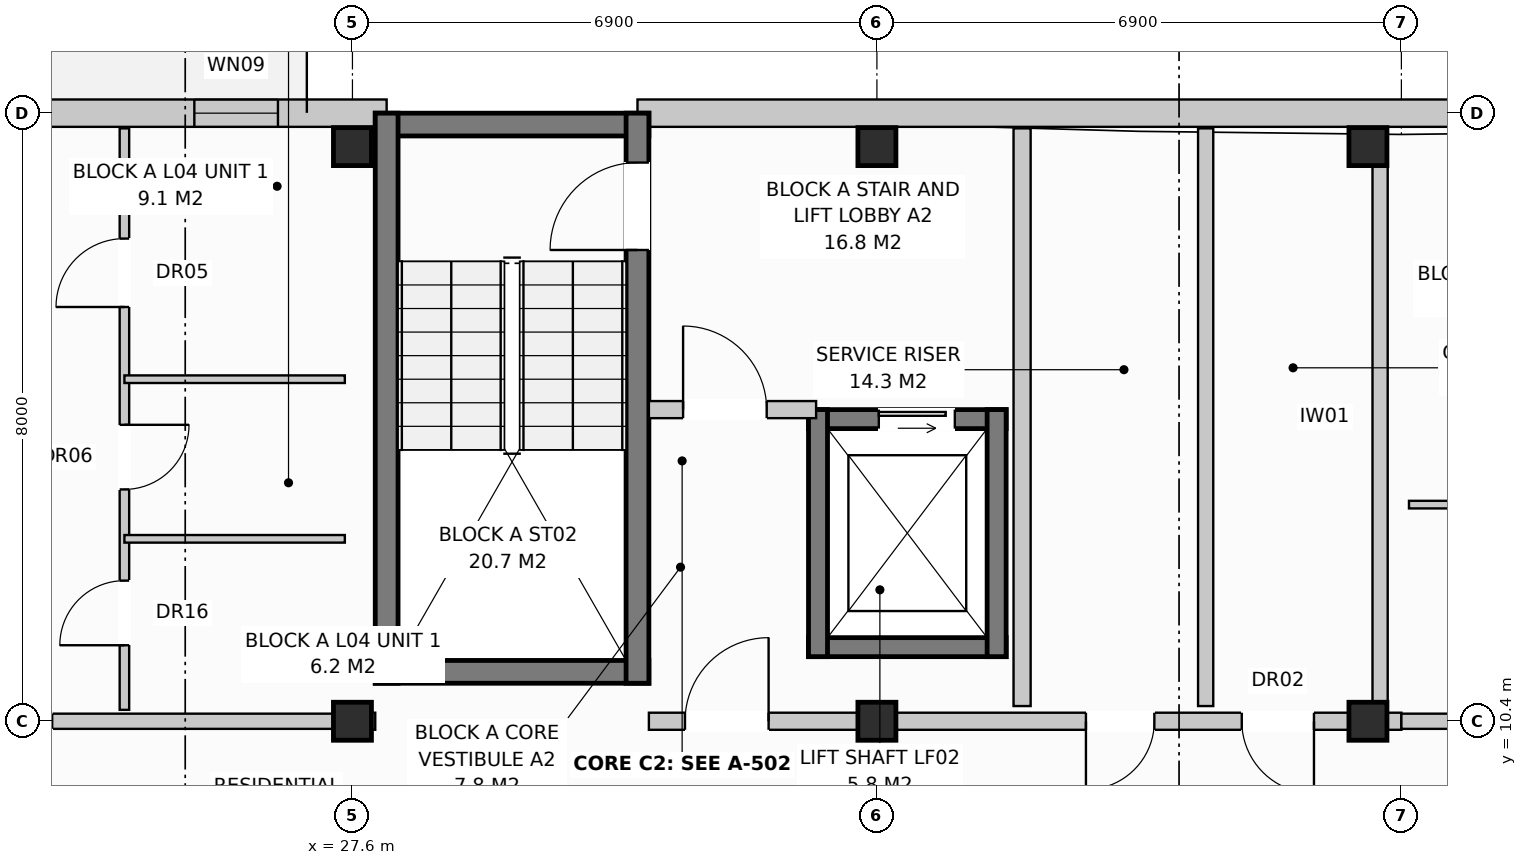
"""IFC4 building model, lengths in metres.
Left out: names, types, materials, properties, quantities, classifications, styles, units other than length and angle.
Written with IfcOpenShell. Run it as: python <this file> out.ifc"""

import sys

from ifc_helpers import new_model, si_unit, direction, frame, frame_2d, origin, origin_with_axes, origin_2d, place, context, subcontext, project, spatial, rectangle, extrude, element, fill, save


model = new_model("IFC4")
c1 = context("Model", 3, precision=1e-05, world=origin(), true_north=direction((0.0, 1.0)))
c2 = subcontext(c1, "Body", "Model", "MODEL_VIEW")
j1 = project(units=[si_unit("LENGTHUNIT", "METRE"), si_unit("PLANEANGLEUNIT", "RADIAN")], contexts=[c1])
p1 = place(None, origin())
s1 = spatial("IfcSite", under=j1, at=p1, CompositionType="ELEMENT")
p2 = place(p1, origin())
s2 = spatial("IfcBuilding", under=s1, at=p2, CompositionType="ELEMENT")
p3 = place(p2, frame((0.0, 0.0, 14.4)))
s3 = spatial("IfcBuildingStorey", under=s2, at=p3, CompositionType="ELEMENT", Elevation=14.4)
for number, where, z_axis, x_axis in (
    (1, (27.6, 10.4, 0.0), (0.0, 0.0, 1.0), (1.0, 0.0, 0.0)),
    (2, (27.6, 17.96, 0.0), (0.0, 0.0, 1.0), (1.0, 0.0, 0.0)),
    (3, (34.5, 10.4, 0.0), (0.0, 0.0, 1.0), (1.0, 0.0, 0.0)),
    (4, (34.5, 17.96, 0.0), (0.0, 0.0, 1.0), (1.0, 0.0, 0.0)),
    (5, (40.96, 10.4, 0.0), (0.0, 0.0, 1.0), (1.0, 0.0, 0.0)),
    (6, (40.96, 17.96, 0.0), (0.0, 0.0, 1.0), (1.0, 0.0, 0.0)),
):
    element("IfcColumn", number, at=place(p3, frame(where, z_axis=z_axis, x_axis=x_axis)), inside=s3, PredefinedType="COLUMN", context=c2, shape_type="SweptSolid", body=[
        extrude(rectangle(XDim=0.5, YDim=0.5, at=origin_2d()), origin(), (0.0, 0.0, 1.0), 3.2),
    ])
p4 = place(p3, frame((10.65, 18.4, 0.0), z_axis=(0.0, 0.0, 1.0), x_axis=(1.0, 0.0, 0.0)))
e7 = element("IfcWall", 7, at=p4, inside=s3, PredefinedType="STANDARD", context=c2, shape_type="SweptSolid", body=[
    extrude(rectangle(XDim=17.4, YDim=0.36, at=frame_2d((8.7, 0.0))), origin(), (0.0, 0.0, 1.0), 2.94),
])
p5 = place(p4, frame((11.82, 0.0, 0.0)))
e8 = element("IfcOpeningElement", 8, at=p5, cuts=e7, PredefinedType="OPENING", context=c2, shape_type="SweptSolid", body=[
    extrude(rectangle(XDim=1.05, YDim=2.12, at=frame_2d((0.525, 1.06))), frame((0.0, 0.192, 0.0), z_axis=(0.0, -1.0, 0.0), x_axis=(1.0, 0.0, 0.0)), (0.0, 0.0, 1.0), 0.384),
])
p6 = place(p4, frame((14.87, 0.0, 0.72)))
e9 = element("IfcOpeningElement", 9, at=p6, cuts=e7, PredefinedType="OPENING", context=c2, shape_type="SweptSolid", body=[
    extrude(rectangle(XDim=1.1, YDim=1.5, at=frame_2d((0.55, 0.75))), frame((0.0, 0.192, 0.0), z_axis=(0.0, -1.0, 0.0), x_axis=(1.0, 0.0, 0.0)), (0.0, 0.0, 1.0), 0.384),
])
p7 = place(p3, frame((31.35, 18.4, 0.0), z_axis=(0.0, 0.0, 1.0), x_axis=(1.0, 0.0, 0.0)))
e10 = element("IfcWall", 10, at=p7, inside=s3, PredefinedType="STANDARD", context=c2, shape_type="SweptSolid", body=[
    extrude(rectangle(XDim=23.68, YDim=0.36, at=frame_2d((11.84, 0.0))), origin(), (0.0, 0.0, 1.0), 2.94),
])
p8 = place(p7, frame((13.003, 0.0, 0.0)))
e11 = element("IfcOpeningElement", 11, at=p8, cuts=e10, PredefinedType="OPENING", context=c2, shape_type="SweptSolid", body=[
    extrude(rectangle(XDim=1.05, YDim=2.12, at=frame_2d((0.525, 1.06))), frame((0.0, 0.192, 0.0), z_axis=(0.0, -1.0, 0.0), x_axis=(1.0, 0.0, 0.0)), (0.0, 0.0, 1.0), 0.384),
])
p9 = place(p7, frame((11.27, 0.0, 0.72)))
e12 = element("IfcOpeningElement", 12, at=p9, cuts=e10, PredefinedType="OPENING", context=c2, shape_type="SweptSolid", body=[
    extrude(rectangle(XDim=1.1, YDim=1.5, at=frame_2d((0.55, 0.75))), frame((0.0, 0.192, 0.0), z_axis=(0.0, -1.0, 0.0), x_axis=(1.0, 0.0, 0.0)), (0.0, 0.0, 1.0), 0.384),
])
p10 = place(p7, frame((14.545, 0.0, 0.8)))
e13 = element("IfcOpeningElement", 13, at=p10, cuts=e10, PredefinedType="OPENING", context=c2, shape_type="SweptSolid", body=[
    extrude(rectangle(XDim=1.95, YDim=1.65, at=frame_2d((0.975, 0.825))), frame((0.0, 0.192, 0.0), z_axis=(0.0, -1.0, 0.0), x_axis=(1.0, 0.0, 0.0)), (0.0, 0.0, 1.0), 0.384),
])
p11 = place(p7, frame((20.67, 0.0, 0.72)))
e14 = element("IfcOpeningElement", 14, at=p11, cuts=e10, PredefinedType="OPENING", context=c2, shape_type="SweptSolid", body=[
    extrude(rectangle(XDim=1.1, YDim=1.5, at=frame_2d((0.55, 0.75))), frame((0.0, 0.192, 0.0), z_axis=(0.0, -1.0, 0.0), x_axis=(1.0, 0.0, 0.0)), (0.0, 0.0, 1.0), 0.384),
])
for number, where, z_axis, x_axis in (
    (15, (27.9, 18.25, 0.0), (0.0, 0.0, 1.0), (1.0, 0.0, 0.0)),
    (16, (27.9, 11.05, 0.0), (0.0, 0.0, 1.0), (1.0, 0.0, 0.0)),
):
    element("IfcWall", number, at=place(p3, frame(where, z_axis=z_axis, x_axis=x_axis)), inside=s3, PredefinedType="SHEAR", context=c2, shape_type="SweptSolid", body=[
        extrude(rectangle(XDim=3.6, YDim=0.3, at=frame_2d((1.8, 0.0))), origin(), (0.0, 0.0, 1.0), 2.94),
    ])
p12 = place(p3, frame((28.05, 10.9, 0.0), z_axis=(0.0, 0.0, 1.0), x_axis=(0.0, 1.0, 0.0)))
e17 = element("IfcWall", 17, at=p12, inside=s3, PredefinedType="SHEAR", context=c2, shape_type="SweptSolid", body=[
    extrude(rectangle(XDim=7.5, YDim=0.3, at=frame_2d((3.75, 0.0))), origin(), (0.0, 0.0, 1.0), 2.94),
])
p13 = place(p3, frame((31.35, 10.9, 0.0), z_axis=(0.0, 0.0, 1.0), x_axis=(0.0, 1.0, 0.0)))
e18 = element("IfcWall", 18, at=p13, inside=s3, PredefinedType="SHEAR", context=c2, shape_type="SweptSolid", body=[
    extrude(rectangle(XDim=7.5, YDim=0.3, at=frame_2d((3.75, 0.0))), origin(), (0.0, 0.0, 1.0), 2.94),
])
p14 = place(p13, frame((5.7, 0.0, 0.0)))
e19 = element("IfcOpeningElement", 19, at=p14, cuts=e18, PredefinedType="OPENING", context=c2, shape_type="SweptSolid", body=[
    extrude(rectangle(XDim=1.15, YDim=2.15, at=frame_2d((0.575, 1.075))), frame((0.0, 0.162, 0.0), z_axis=(0.0, -1.0, 0.0), x_axis=(1.0, 0.0, 0.0)), (0.0, 0.0, 1.0), 0.324),
])
p15 = place(p3, frame((33.6, 14.375, 0.0), z_axis=(0.0, 0.0, 1.0), x_axis=(1.0, 0.0, 0.0)))
e20 = element("IfcWall", 20, at=p15, inside=s3, PredefinedType="SHEAR", context=c2, shape_type="SweptSolid", body=[
    extrude(rectangle(XDim=2.6, YDim=0.25, at=frame_2d((1.3, 0.0))), origin(), (0.0, 0.0, 1.0), 2.94),
])
p16 = place(p15, frame((0.925, 0.0, 0.0)))
e21 = element("IfcOpeningElement", 21, at=p16, cuts=e20, PredefinedType="OPENING", context=c2, shape_type="SweptSolid", body=[
    extrude(rectangle(XDim=1.0, YDim=2.1, at=frame_2d((0.5, 1.05))), frame((0.0, 0.137, 0.0), z_axis=(0.0, -1.0, 0.0), x_axis=(1.0, 0.0, 0.0)), (0.0, 0.0, 1.0), 0.274),
])
p17 = place(p3, frame((33.6, 11.375, 0.0), z_axis=(0.0, 0.0, 1.0), x_axis=(1.0, 0.0, 0.0)))
e22 = element("IfcWall", 22, at=p17, inside=s3, PredefinedType="SHEAR", context=c2, shape_type="SweptSolid", body=[
    extrude(rectangle(XDim=2.6, YDim=0.25, at=frame_2d((1.3, 0.0))), origin(), (0.0, 0.0, 1.0), 2.94),
])
for number, where, z_axis, x_axis in (
    (23, (33.725, 11.25, 0.0), (0.0, 0.0, 1.0), (0.0, 1.0, 0.0)),
    (24, (36.075, 11.25, 0.0), (0.0, 0.0, 1.0), (0.0, 1.0, 0.0)),
):
    element("IfcWall", number, at=place(p3, frame(where, z_axis=z_axis, x_axis=x_axis)), inside=s3, PredefinedType="SHEAR", context=c2, shape_type="SweptSolid", body=[
        extrude(rectangle(XDim=3.25, YDim=0.25, at=frame_2d((1.625, 0.0))), origin(), (0.0, 0.0, 1.0), 2.94),
    ])
p18 = place(p3, frame((36.41, 10.6, 0.0), z_axis=(0.0, 0.0, 1.0), x_axis=(0.0, 1.0, 0.0)))
e25 = element("IfcWall", 25, at=p18, inside=s3, PredefinedType="PARTITIONING", context=c2, shape_type="SweptSolid", body=[
    extrude(rectangle(XDim=7.6, YDim=0.225, at=frame_2d((3.8, 0.0))), origin(), (0.0, 0.0, 1.0), 2.59),
])
p19 = place(p3, frame((31.5, 14.5, 0.0), z_axis=(0.0, 0.0, 1.0), x_axis=(1.0, 0.0, 0.0)))
e26 = element("IfcWall", 26, at=p19, inside=s3, PredefinedType="PARTITIONING", context=c2, shape_type="SweptSolid", body=[
    extrude(rectangle(XDim=2.2, YDim=0.225, at=frame_2d((1.1, 0.0))), origin(), (0.0, 0.0, 1.0), 2.94),
])
p20 = place(p19, frame((0.45, 0.0, 0.0)))
e27 = element("IfcOpeningElement", 27, at=p20, cuts=e26, PredefinedType="OPENING", context=c2, shape_type="SweptSolid", body=[
    extrude(rectangle(XDim=1.1, YDim=2.15, at=frame_2d((0.55, 1.075))), frame((0.0, 0.125, 0.0), z_axis=(0.0, -1.0, 0.0), x_axis=(1.0, 0.0, 0.0)), (0.0, 0.0, 1.0), 0.249),
])
p21 = place(p3, frame((27.6, 10.4, 0.0), z_axis=(0.0, 0.0, 1.0), x_axis=(1.0, 0.0, 0.0)))
e28 = element("IfcWall", 28, at=p21, inside=s3, PredefinedType="PARTITIONING", context=c2, shape_type="SweptSolid", body=[
    extrude(rectangle(XDim=0.3, YDim=0.225, at=frame_2d((0.15, 0.0))), origin(), (0.0, 0.0, 1.0), 2.94),
])
for number, where, z_axis, x_axis in (
    (29, (38.825, 10.6, 0.0), (0.0, 0.0, 1.0), (0.0, 1.0, 0.0)),
    (30, (41.12, 10.6, 0.0), (0.0, 0.0, 1.0), (0.0, 1.0, 0.0)),
):
    element("IfcWall", number, at=place(p3, frame(where, z_axis=z_axis, x_axis=x_axis)), inside=s3, PredefinedType="PARTITIONING", context=c2, shape_type="SweptSolid", body=[
        extrude(rectangle(XDim=7.6, YDim=0.2, at=frame_2d((3.8, 0.0))), origin(), (0.0, 0.0, 1.0), 2.94),
    ])
p22 = place(p3, frame((31.5, 10.4, 0.0), z_axis=(0.0, 0.0, 1.0), x_axis=(1.0, 0.0, 0.0)))
e31 = element("IfcWall", 31, at=p22, inside=s3, PredefinedType="PARTITIONING", context=c2, shape_type="SweptSolid", body=[
    extrude(rectangle(XDim=9.9, YDim=0.225, at=frame_2d((4.95, 0.0))), origin(), (0.0, 0.0, 1.0), 2.38),
])
p23 = place(p22, frame((0.475, 0.0, 0.0)))
e32 = element("IfcOpeningElement", 32, at=p23, cuts=e31, PredefinedType="OPENING", context=c2, shape_type="SweptSolid", body=[
    extrude(rectangle(XDim=1.1, YDim=2.15, at=frame_2d((0.55, 1.075))), frame((0.0, 0.125, 0.0), z_axis=(0.0, -1.0, 0.0), x_axis=(1.0, 0.0, 0.0)), (0.0, 0.0, 1.0), 0.249),
])
p24 = place(p22, frame((5.75, 0.0, 0.0)))
e33 = element("IfcOpeningElement", 33, at=p24, cuts=e31, PredefinedType="OPENING", context=c2, shape_type="SweptSolid", body=[
    extrude(rectangle(XDim=0.9, YDim=2.1, at=frame_2d((0.45, 1.05))), frame((0.0, 0.125, 0.0), z_axis=(0.0, -1.0, 0.0), x_axis=(1.0, 0.0, 0.0)), (0.0, 0.0, 1.0), 0.249),
])
p25 = place(p22, frame((7.8, 0.0, 0.0)))
e34 = element("IfcOpeningElement", 34, at=p25, cuts=e31, PredefinedType="OPENING", context=c2, shape_type="SweptSolid", body=[
    extrude(rectangle(XDim=0.95, YDim=2.15, at=frame_2d((0.475, 1.075))), frame((0.0, 0.125, 0.0), z_axis=(0.0, -1.0, 0.0), x_axis=(1.0, 0.0, 0.0)), (0.0, 0.0, 1.0), 0.249),
])
p26 = place(p3, frame((20.7, 10.4, 0.0), z_axis=(0.0, 0.0, 1.0), x_axis=(1.0, 0.0, 0.0)))
e35 = element("IfcWall", 35, at=p26, inside=s3, PredefinedType="PARTITIONING", context=c2, shape_type="SweptSolid", body=[
    extrude(rectangle(XDim=6.9, YDim=0.2, at=frame_2d((3.45, 0.0))), origin(), (0.0, 0.0, 1.0), 2.38),
])
p27 = place(p26, frame((2.0, 0.0, 0.0)))
e36 = element("IfcOpeningElement", 36, at=p27, cuts=e35, PredefinedType="OPENING", context=c2, shape_type="SweptSolid", body=[
    extrude(rectangle(XDim=0.95, YDim=2.15, at=frame_2d((0.475, 1.075))), frame((0.0, 0.112, 0.0), z_axis=(0.0, -1.0, 0.0), x_axis=(1.0, 0.0, 0.0)), (0.0, 0.0, 1.0), 0.224),
])
p28 = place(p3, frame((24.6, 10.55, 0.0), z_axis=(0.0, 0.0, 1.0), x_axis=(0.0, 1.0, 0.0)))
e37 = element("IfcWall", 37, at=p28, inside=s3, PredefinedType="PARTITIONING", context=c2, shape_type="SweptSolid", body=[
    extrude(rectangle(XDim=7.65, YDim=0.125, at=frame_2d((3.825, 0.0))), origin(), (0.0, 0.0, 1.0), 2.94),
])
p29 = place(p28, frame((0.85, 0.0, 0.0)))
e38 = element("IfcOpeningElement", 38, at=p29, cuts=e37, PredefinedType="OPENING", context=c2, shape_type="SweptSolid", body=[
    extrude(rectangle(XDim=0.85, YDim=2.1, at=frame_2d((0.425, 1.05))), frame((0.0, 0.074, 0.0), z_axis=(0.0, -1.0, 0.0), x_axis=(1.0, 0.0, 0.0)), (0.0, 0.0, 1.0), 0.149),
])
p30 = place(p28, frame((2.9, 0.0, 0.0)))
e39 = element("IfcOpeningElement", 39, at=p30, cuts=e37, PredefinedType="OPENING", context=c2, shape_type="SweptSolid", body=[
    extrude(rectangle(XDim=0.85, YDim=2.05, at=frame_2d((0.425, 1.025))), frame((0.0, 0.074, 0.0), z_axis=(0.0, -1.0, 0.0), x_axis=(1.0, 0.0, 0.0)), (0.0, 0.0, 1.0), 0.149),
])
p31 = place(p28, frame((5.3, 0.0, 0.0)))
e40 = element("IfcOpeningElement", 40, at=p31, cuts=e37, PredefinedType="OPENING", context=c2, shape_type="SweptSolid", body=[
    extrude(rectangle(XDim=0.9, YDim=2.1, at=frame_2d((0.45, 1.05))), frame((0.0, 0.074, 0.0), z_axis=(0.0, -1.0, 0.0), x_axis=(1.0, 0.0, 0.0)), (0.0, 0.0, 1.0), 0.149),
])
for number, where, z_axis, x_axis in (
    (41, (24.6, 12.8, 0.0), (0.0, 0.0, 1.0), (1.0, 0.0, 0.0)),
    (42, (24.6, 14.9, 0.0), (0.0, 0.0, 1.0), (1.0, 0.0, 0.0)),
):
    element("IfcWall", number, at=place(p3, frame(where, z_axis=z_axis, x_axis=x_axis)), inside=s3, PredefinedType="PARTITIONING", context=c2, shape_type="SweptSolid", body=[
        extrude(rectangle(XDim=2.9, YDim=0.1, at=frame_2d((1.45, 0.0))), origin(), (0.0, 0.0, 1.0), 2.94),
    ])
p32 = place(p3, frame((41.4, 10.4, 0.0), z_axis=(0.0, 0.0, 1.0), x_axis=(1.0, 0.0, 0.0)))
e43 = element("IfcWall", 43, at=p32, inside=s3, PredefinedType="PARTITIONING", context=c2, shape_type="SweptSolid", body=[
    extrude(rectangle(XDim=13.8, YDim=0.2, at=frame_2d((6.9, 0.0))), origin(), (0.0, 0.0, 1.0), 2.38),
])
p33 = place(p32, frame((9.6, 0.0, 0.0)))
e44 = element("IfcOpeningElement", 44, at=p33, cuts=e43, PredefinedType="OPENING", context=c2, shape_type="SweptSolid", body=[
    extrude(rectangle(XDim=0.95, YDim=2.15, at=frame_2d((0.475, 1.075))), frame((0.0, 0.112, 0.0), z_axis=(0.0, -1.0, 0.0), x_axis=(1.0, 0.0, 0.0)), (0.0, 0.0, 1.0), 0.224),
])
p34 = place(p3, frame((41.5, 13.25, 0.0), z_axis=(0.0, 0.0, 1.0), x_axis=(1.0, 0.0, 0.0)))
e45 = element("IfcWall", 45, at=p34, inside=s3, PredefinedType="PARTITIONING", context=c2, shape_type="SweptSolid", body=[
    extrude(rectangle(XDim=8.6, YDim=0.1, at=frame_2d((4.3, 0.0))), origin(), (0.0, 0.0, 1.0), 2.94),
])
p35 = place(p34, frame((1.4, 0.0, 0.0)))
e46 = element("IfcOpeningElement", 46, at=p35, cuts=e45, PredefinedType="OPENING", context=c2, shape_type="SweptSolid", body=[
    extrude(rectangle(XDim=0.85, YDim=2.05, at=frame_2d((0.425, 1.025))), frame((0.0, 0.062, 0.0), z_axis=(0.0, -1.0, 0.0), x_axis=(1.0, 0.0, 0.0)), (0.0, 0.0, 1.0), 0.124),
])
p36 = place(p34, frame((4.65, 0.0, 0.0)))
e47 = element("IfcOpeningElement", 47, at=p36, cuts=e45, PredefinedType="OPENING", context=c2, shape_type="SweptSolid", body=[
    extrude(rectangle(XDim=0.85, YDim=2.05, at=frame_2d((0.425, 1.025))), frame((0.0, 0.062, 0.0), z_axis=(0.0, -1.0, 0.0), x_axis=(1.0, 0.0, 0.0)), (0.0, 0.0, 1.0), 0.124),
])
p37 = place(p34, frame((6.8, 0.0, 0.0)))
e48 = element("IfcOpeningElement", 48, at=p37, cuts=e45, PredefinedType="OPENING", context=c2, shape_type="SweptSolid", body=[
    extrude(rectangle(XDim=0.85, YDim=2.1, at=frame_2d((0.425, 1.05))), frame((0.0, 0.062, 0.0), z_axis=(0.0, -1.0, 0.0), x_axis=(1.0, 0.0, 0.0)), (0.0, 0.0, 1.0), 0.124),
])
p38 = place(p6, origin_with_axes())
e49 = element("IfcWindow", 49, at=p38, inside=s3, PartitioningType="SINGLE_PANEL", PredefinedType="WINDOW", context=c2, shape_type="SweptSolid", body=[
    extrude(rectangle(XDim=1.1, YDim=1.5, at=frame_2d((0.55, 0.75))), frame((0.0, 0.03, 0.0), z_axis=(0.0, -1.0, 0.0), x_axis=(1.0, 0.0, 0.0)), (0.0, 0.0, 1.0), 0.06),
])
fill(e9, e49)
p39 = place(p14, origin_with_axes())
e50 = element("IfcDoor", 50, at=p39, inside=s3, OperationType="SINGLE_SWING_LEFT", PredefinedType="DOOR", context=c2, shape_type="SweptSolid", body=[
    extrude(rectangle(XDim=1.15, YDim=2.15, at=frame_2d((0.575, 1.075))), frame((0.0, 0.025, 0.0), z_axis=(0.0, -1.0, 0.0), x_axis=(1.0, 0.0, 0.0)), (0.0, 0.0, 1.0), 0.05),
])
fill(e19, e50)
p40 = place(p16, origin_with_axes())
e51 = element("IfcDoor", 51, at=p40, inside=s3, OperationType="SLIDING_TO_LEFT", PredefinedType="DOOR", context=c2, shape_type="SweptSolid", body=[
    extrude(rectangle(XDim=1.0, YDim=2.1, at=frame_2d((0.5, 1.05))), frame((0.0, 0.025, 0.0), z_axis=(0.0, -1.0, 0.0), x_axis=(1.0, 0.0, 0.0)), (0.0, 0.0, 1.0), 0.05),
])
fill(e21, e51)
p41 = place(p20, origin_with_axes())
e52 = element("IfcDoor", 52, at=p41, inside=s3, OperationType="SINGLE_SWING_LEFT", PredefinedType="DOOR", context=c2, shape_type="SweptSolid", body=[
    extrude(rectangle(XDim=1.1, YDim=2.15, at=frame_2d((0.55, 1.075))), frame((0.0, 0.025, 0.0), z_axis=(0.0, -1.0, 0.0), x_axis=(1.0, 0.0, 0.0)), (0.0, 0.0, 1.0), 0.05),
])
fill(e27, e52)
p42 = place(p23, origin_with_axes())
e53 = element("IfcDoor", 53, at=p42, inside=s3, OperationType="SINGLE_SWING_RIGHT", PredefinedType="DOOR", context=c2, shape_type="SweptSolid", body=[
    extrude(rectangle(XDim=1.1, YDim=2.15, at=frame_2d((0.55, 1.075))), frame((0.0, 0.025, 0.0), z_axis=(0.0, -1.0, 0.0), x_axis=(1.0, 0.0, 0.0)), (0.0, 0.0, 1.0), 0.05),
])
fill(e32, e53)
p43 = place(p24, frame((0.9, 0.0, 0.0), z_axis=(0.0, 0.0, 1.0), x_axis=(-1.0, 0.0, 0.0)))
e54 = element("IfcDoor", 54, at=p43, inside=s3, OperationType="SINGLE_SWING_LEFT", PredefinedType="DOOR", context=c2, shape_type="SweptSolid", body=[
    extrude(rectangle(XDim=0.9, YDim=2.1, at=frame_2d((0.45, 1.05))), frame((0.0, 0.025, 0.0), z_axis=(0.0, -1.0, 0.0), x_axis=(1.0, 0.0, 0.0)), (0.0, 0.0, 1.0), 0.05),
])
fill(e33, e54)
p44 = place(p25, frame((0.95, 0.0, 0.0), z_axis=(0.0, 0.0, 1.0), x_axis=(-1.0, 0.0, 0.0)))
e55 = element("IfcDoor", 55, at=p44, inside=s3, OperationType="SINGLE_SWING_RIGHT", PredefinedType="DOOR", context=c2, shape_type="SweptSolid", body=[
    extrude(rectangle(XDim=0.95, YDim=2.15, at=frame_2d((0.475, 1.075))), frame((0.0, 0.025, 0.0), z_axis=(0.0, -1.0, 0.0), x_axis=(1.0, 0.0, 0.0)), (0.0, 0.0, 1.0), 0.05),
])
fill(e34, e55)
p45 = place(p27, origin_with_axes())
e56 = element("IfcDoor", 56, at=p45, inside=s3, OperationType="SINGLE_SWING_LEFT", PredefinedType="DOOR", context=c2, shape_type="SweptSolid", body=[
    extrude(rectangle(XDim=0.95, YDim=2.15, at=frame_2d((0.475, 1.075))), frame((0.0, 0.025, 0.0), z_axis=(0.0, -1.0, 0.0), x_axis=(1.0, 0.0, 0.0)), (0.0, 0.0, 1.0), 0.05),
])
fill(e36, e56)
p46 = place(p29, origin_with_axes())
e57 = element("IfcDoor", 57, at=p46, inside=s3, OperationType="SINGLE_SWING_LEFT", PredefinedType="DOOR", context=c2, shape_type="SweptSolid", body=[
    extrude(rectangle(XDim=0.85, YDim=2.1, at=frame_2d((0.425, 1.05))), frame((0.0, 0.025, 0.0), z_axis=(0.0, -1.0, 0.0), x_axis=(1.0, 0.0, 0.0)), (0.0, 0.0, 1.0), 0.05),
])
fill(e38, e57)
p47 = place(p30, frame((0.85, 0.0, 0.0), z_axis=(0.0, 0.0, 1.0), x_axis=(-1.0, 0.0, 0.0)))
e58 = element("IfcDoor", 58, at=p47, inside=s3, OperationType="SINGLE_SWING_RIGHT", PredefinedType="DOOR", context=c2, shape_type="SweptSolid", body=[
    extrude(rectangle(XDim=0.85, YDim=2.05, at=frame_2d((0.425, 1.025))), frame((0.0, 0.025, 0.0), z_axis=(0.0, -1.0, 0.0), x_axis=(1.0, 0.0, 0.0)), (0.0, 0.0, 1.0), 0.05),
])
fill(e39, e58)
p48 = place(p31, origin_with_axes())
e59 = element("IfcDoor", 59, at=p48, inside=s3, OperationType="SINGLE_SWING_LEFT", PredefinedType="DOOR", context=c2, shape_type="SweptSolid", body=[
    extrude(rectangle(XDim=0.9, YDim=2.1, at=frame_2d((0.45, 1.05))), frame((0.0, 0.025, 0.0), z_axis=(0.0, -1.0, 0.0), x_axis=(1.0, 0.0, 0.0)), (0.0, 0.0, 1.0), 0.05),
])
fill(e40, e59)
save(model, sys.argv[1])
